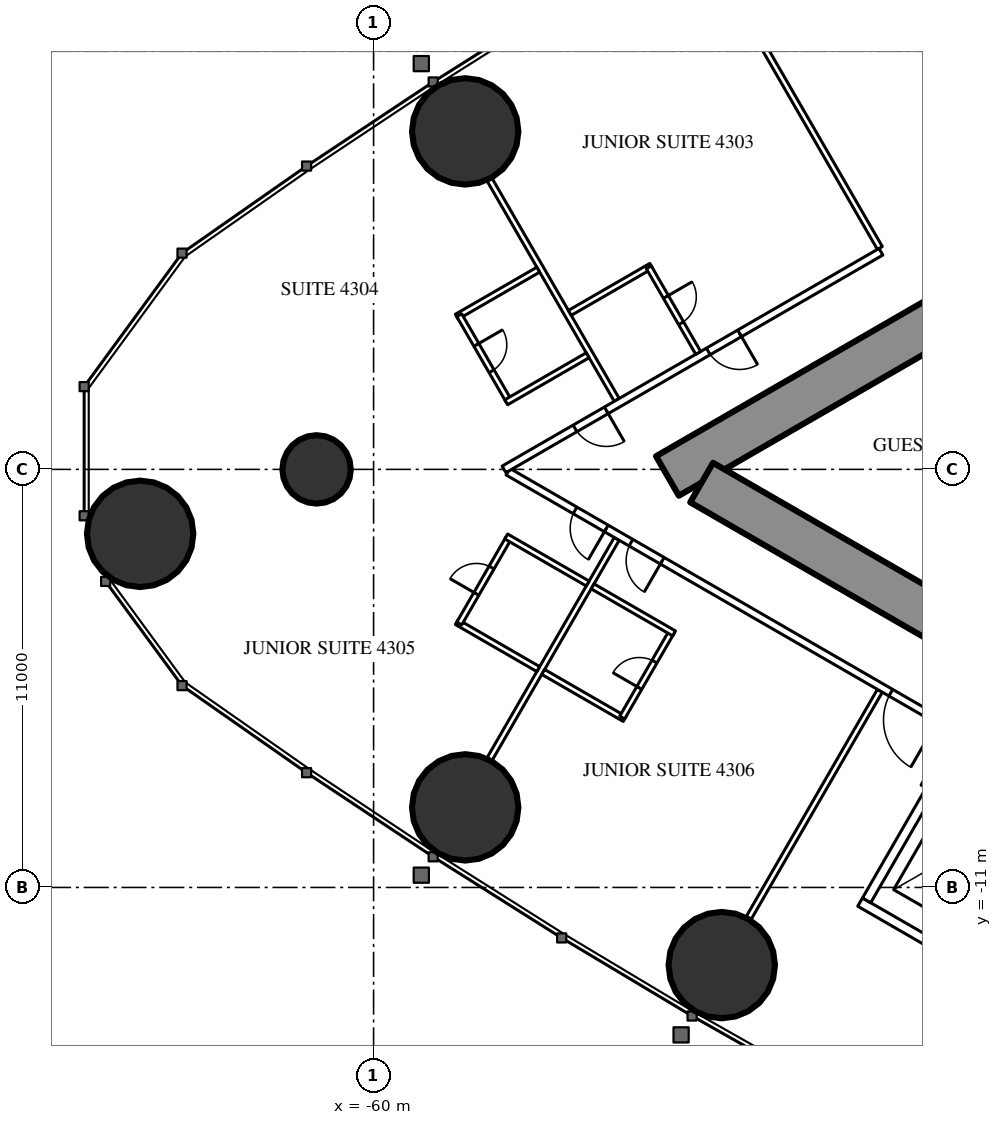
"""IFC4 building model, lengths in metres.
Left out: names, types, materials, properties, quantities, classifications, styles, units other than length and angle.
Written with IfcOpenShell. Run it as: python <this file> out.ifc"""

import sys

from ifc_helpers import new_model, si_unit, direction, frame, frame_2d, origin, origin_2d, place, context, subcontext, project, spatial, rectangle, circle, extrude, element, fill, save


model = new_model("IFC4")
c1 = context("Model", 3, precision=1e-05, world=origin(), true_north=direction((0.0, 1.0)))
c2 = subcontext(c1, "Body", "Model", "MODEL_VIEW")
j1 = project(units=[si_unit("LENGTHUNIT", "METRE"), si_unit("PLANEANGLEUNIT", "RADIAN")], contexts=[c1])
p1 = place(None, origin())
s1 = spatial("IfcSite", under=j1, at=p1, CompositionType="ELEMENT")
p2 = place(p1, origin())
s2 = spatial("IfcBuilding", under=s1, at=p2, CompositionType="ELEMENT")
p3 = place(p2, frame((0.0, 0.0, 163.3)))
s3 = spatial("IfcBuildingStorey", under=s2, at=p3, CompositionType="ELEMENT", Elevation=163.3)
for number, where, z_axis, x_axis in (
    (1, (-66.143, -1.695, 0.0), (0.0, 0.0, 1.0), (1.0, 0.0, 0.0)),
    (2, (-57.59, -8.893, 0.0), (0.0, 0.0, 1.0), (1.0, 0.0, 0.0)),
    (3, (-50.839, -13.043, 0.0), (0.0, 0.0, 1.0), (1.0, 0.0, 0.0)),
    (4, (-57.59, 8.893, 0.0), (0.0, 0.0, 1.0), (1.0, 0.0, 0.0)),
):
    element("IfcColumn", number, at=place(p3, frame(where, z_axis=z_axis, x_axis=x_axis)), inside=s3, PredefinedType="COLUMN", context=c2, shape_type="SweptSolid", body=[
        extrude(circle(Radius=1.4, at=origin_2d()), origin(), (0.0, 0.0, 1.0), 3.5),
    ])
p4 = place(p3, frame((-61.5, 0.0, 0.0), z_axis=(0.0, 0.0, 1.0), x_axis=(1.0, 0.0, 0.0)))
e5 = element("IfcColumn", 5, at=p4, inside=s3, PredefinedType="COLUMN", context=c2, shape_type="SweptSolid", body=[
    extrude(circle(Radius=0.9, at=origin_2d()), origin(), (0.0, 0.0, 1.0), 3.5),
])
p5 = place(p3, frame((-27.2, 14.3, 0.0), z_axis=(0.0, 0.0, 1.0), x_axis=(-0.866026593062, -0.499997940104, 0.0)))
e6 = element("IfcWall", 6, at=p5, inside=s3, PredefinedType="SHEAR", context=c2, shape_type="SweptSolid", body=[
    extrude(rectangle(XDim=28.946, YDim=1.2, at=frame_2d((14.473, 0.0))), origin(), (0.0, 0.0, 1.0), 3.5),
])
p6 = place(p5, frame((4.6, 0.0, 0.0)))
e7 = element("IfcOpeningElement", 7, at=p6, cuts=e6, PredefinedType="OPENING", context=c2, shape_type="SweptSolid", body=[
    extrude(rectangle(XDim=1.0, YDim=2.2, at=frame_2d((0.5, 1.1))), frame((0.0, 0.61, 0.0), z_axis=(0.0, -1.0, 0.0), x_axis=(1.0, 0.0, 0.0)), (0.0, 0.0, 1.0), 1.22),
])
p7 = place(p5, frame((13.395, 0.0, 0.0)))
e8 = element("IfcOpeningElement", 8, at=p7, cuts=e6, PredefinedType="OPENING", context=c2, shape_type="SweptSolid", body=[
    extrude(rectangle(XDim=1.8, YDim=2.2, at=frame_2d((0.9, 1.1))), frame((0.0, 0.61, 0.0), z_axis=(0.0, -1.0, 0.0), x_axis=(1.0, 0.0, 0.0)), (0.0, 0.0, 1.0), 1.22),
])
p8 = place(p3, frame((-27.2, -14.3, 0.0), z_axis=(0.0, 0.0, 1.0), x_axis=(-0.866024021859, 0.500002393557, 0.0)))
e9 = element("IfcWall", 9, at=p8, inside=s3, PredefinedType="SHEAR", context=c2, shape_type="SweptSolid", body=[
    extrude(rectangle(XDim=27.907, YDim=1.2, at=frame_2d((13.954, 0.0))), origin(), (0.0, 0.0, 1.0), 3.5),
])
p9 = place(p8, frame((4.6, 0.0, 0.0)))
e10 = element("IfcOpeningElement", 10, at=p9, cuts=e9, PredefinedType="OPENING", context=c2, shape_type="SweptSolid", body=[
    extrude(rectangle(XDim=1.0, YDim=2.2, at=frame_2d((0.5, 1.1))), frame((0.0, 0.61, 0.0), z_axis=(0.0, -1.0, 0.0), x_axis=(1.0, 0.0, 0.0)), (0.0, 0.0, 1.0), 1.22),
])
p10 = place(p8, frame((13.395, 0.0, 0.0)))
e11 = element("IfcOpeningElement", 11, at=p10, cuts=e9, PredefinedType="OPENING", context=c2, shape_type="SweptSolid", body=[
    extrude(rectangle(XDim=1.8, YDim=2.2, at=frame_2d((0.9, 1.1))), frame((0.0, 0.61, 0.0), z_axis=(0.0, -1.0, 0.0), x_axis=(1.0, 0.0, 0.0)), (0.0, 0.0, 1.0), 1.22),
])
p11 = place(p3, frame((-46.679, 5.825, 0.0), z_axis=(0.0, 0.0, 1.0), x_axis=(-0.500006839597, 0.866021454905, 0.0)))
e12 = element("IfcWall", 12, at=p11, inside=s3, PredefinedType="PARTITIONING", context=c2, shape_type="SweptSolid", body=[
    extrude(rectangle(XDim=6.911, YDim=0.15, at=frame_2d((3.456, 0.0))), origin(), (0.0, 0.0, 1.0), 2.3),
])
p12 = place(p3, frame((-53.602, 1.828, 0.0), z_axis=(0.0, 0.0, 1.0), x_axis=(-0.49999191814, 0.866030069798, 0.0)))
e13 = element("IfcWall", 13, at=p12, inside=s3, PredefinedType="PARTITIONING", context=c2, shape_type="SweptSolid", body=[
    extrude(rectangle(XDim=6.692, YDim=0.15, at=frame_2d((3.346, 0.0))), origin(), (0.0, 0.0, 1.0), 2.3),
])
p13 = place(p3, frame((-46.679, -5.825, 0.0), z_axis=(0.0, 0.0, 1.0), x_axis=(-0.500006839597, -0.866021454905, 0.0)))
e14 = element("IfcWall", 14, at=p13, inside=s3, PredefinedType="PARTITIONING", context=c2, shape_type="SweptSolid", body=[
    extrude(rectangle(XDim=6.911, YDim=0.15, at=frame_2d((3.456, 0.0))), origin(), (0.0, 0.0, 1.0), 2.3),
])
p14 = place(p3, frame((-53.602, -1.828, 0.0), z_axis=(0.0, 0.0, 1.0), x_axis=(-0.49999191814, -0.866030069798, 0.0)))
e15 = element("IfcWall", 15, at=p14, inside=s3, PredefinedType="PARTITIONING", context=c2, shape_type="SweptSolid", body=[
    extrude(rectangle(XDim=6.692, YDim=0.15, at=frame_2d((3.346, 0.0))), origin(), (0.0, 0.0, 1.0), 2.3),
])
p15 = place(p3, frame((-44.715, -6.844, 0.0), z_axis=(0.0, 0.0, 1.0), x_axis=(-0.866025261224, 0.500000246922, 0.0)))
e16 = element("IfcWall", 16, at=p15, inside=s3, PredefinedType="PARTITIONING", context=c2, shape_type="SweptSolid", body=[
    extrude(rectangle(XDim=13.567, YDim=0.2, at=frame_2d((6.783, 0.0))), origin(), (0.0, 0.0, 1.0), 3.25),
])
p16 = place(p15, frame((10.579, 0.0, 0.0)))
e17 = element("IfcOpeningElement", 17, at=p16, cuts=e16, PredefinedType="OPENING", context=c2, shape_type="SweptSolid", body=[
    extrude(rectangle(XDim=0.95, YDim=2.2, at=frame_2d((0.475, 1.1))), frame((0.0, 0.11, 0.0), z_axis=(0.0, -1.0, 0.0), x_axis=(1.0, 0.0, 0.0)), (0.0, 0.0, 1.0), 0.22),
])
p17 = place(p15, frame((8.879, 0.0, 0.0)))
e18 = element("IfcOpeningElement", 18, at=p17, cuts=e16, PredefinedType="OPENING", context=c2, shape_type="SweptSolid", body=[
    extrude(rectangle(XDim=0.95, YDim=2.2, at=frame_2d((0.475, 1.1))), frame((0.0, 0.11, 0.0), z_axis=(0.0, -1.0, 0.0), x_axis=(1.0, 0.0, 0.0)), (0.0, 0.0, 1.0), 0.22),
])
p18 = place(p15, frame((0.5, 0.0, 0.0)))
e19 = element("IfcOpeningElement", 19, at=p18, cuts=e16, PredefinedType="OPENING", context=c2, shape_type="SweptSolid", body=[
    extrude(rectangle(XDim=1.435, YDim=2.2, at=frame_2d((0.718, 1.1))), frame((0.0, 0.11, 0.0), z_axis=(0.0, -1.0, 0.0), x_axis=(1.0, 0.0, 0.0)), (0.0, 0.0, 1.0), 0.22),
])
p19 = place(p3, frame((-44.652, -6.764, 0.0), z_axis=(0.0, 0.0, 1.0), x_axis=(-0.485424724123, -0.874278466629, 0.0)))
e20 = element("IfcWall", 20, at=p19, inside=s3, PredefinedType="PARTITIONING", context=c2, shape_type="SweptSolid", body=[
    extrude(rectangle(XDim=1.805, YDim=0.15, at=frame_2d((0.903, 0.0))), origin(), (0.0, 0.0, 1.0), 3.25),
])
p20 = place(p3, frame((-46.65, 5.726, 0.0), z_axis=(0.0, 0.0, 1.0), x_axis=(-0.866027963864, -0.499995565786, 0.0)))
e21 = element("IfcWall", 21, at=p20, inside=s3, PredefinedType="PARTITIONING", context=c2, shape_type="SweptSolid", body=[
    extrude(rectangle(XDim=11.452, YDim=0.2, at=frame_2d((5.726, 0.0))), origin(), (0.0, 0.0, 1.0), 3.25),
])
p21 = place(p20, frame((4.294, 0.0, 0.0)))
e22 = element("IfcOpeningElement", 22, at=p21, cuts=e21, PredefinedType="OPENING", context=c2, shape_type="SweptSolid", body=[
    extrude(rectangle(XDim=0.95, YDim=2.2, at=frame_2d((0.475, 1.1))), frame((0.0, 0.11, 0.0), z_axis=(0.0, -1.0, 0.0), x_axis=(1.0, 0.0, 0.0)), (0.0, 0.0, 1.0), 0.22),
])
p22 = place(p20, frame((8.344, 0.0, 0.0)))
e23 = element("IfcOpeningElement", 23, at=p22, cuts=e21, PredefinedType="OPENING", context=c2, shape_type="SweptSolid", body=[
    extrude(rectangle(XDim=0.95, YDim=2.2, at=frame_2d((0.475, 1.1))), frame((0.0, 0.11, 0.0), z_axis=(0.0, -1.0, 0.0), x_axis=(1.0, 0.0, 0.0)), (0.0, 0.0, 1.0), 0.22),
])
p23 = place(p3, frame((-52.694, 5.355, 0.0), z_axis=(0.0, 0.0, 1.0), x_axis=(-0.866031185235, -0.4999899861, 0.0)))
e24 = element("IfcWall", 24, at=p23, inside=s3, PredefinedType="PARTITIONING", context=c2, shape_type="SweptSolid", body=[
    extrude(rectangle(XDim=2.475, YDim=0.15, at=frame_2d((1.238, 0.0))), origin(), (0.0, 0.0, 1.0), 3.25),
])
p24 = place(p3, frame((-51.459, 3.065, 0.0), z_axis=(0.0, 0.0, 1.0), x_axis=(-0.499936506574, 0.866062058628, 0.0)))
e25 = element("IfcWall", 25, at=p24, inside=s3, PredefinedType="PARTITIONING", context=c2, shape_type="SweptSolid", body=[
    extrude(rectangle(XDim=2.6, YDim=0.15, at=frame_2d((1.3, 0.0))), origin(), (0.0, 0.0, 1.0), 3.25),
])
p25 = place(p24, frame((0.9, 0.0, 0.0)))
e26 = element("IfcOpeningElement", 26, at=p25, cuts=e25, PredefinedType="OPENING", context=c2, shape_type="SweptSolid", body=[
    extrude(rectangle(XDim=0.8, YDim=2.2, at=frame_2d((0.4, 1.1))), frame((0.0, 0.085, 0.0), z_axis=(0.0, -1.0, 0.0), x_axis=(1.0, 0.0, 0.0)), (0.0, 0.0, 1.0), 0.17),
])
p26 = place(p3, frame((-55.667, 5.255, 0.0), z_axis=(0.0, 0.0, 1.0), x_axis=(-0.866006523861, -0.500032699561, 0.0)))
e27 = element("IfcWall", 27, at=p26, inside=s3, PredefinedType="PARTITIONING", context=c2, shape_type="SweptSolid", body=[
    extrude(rectangle(XDim=2.475, YDim=0.15, at=frame_2d((1.237, 0.0))), origin(), (0.0, 0.0, 1.0), 3.25),
])
p27 = place(p3, frame((-56.446, 1.803, 0.0), z_axis=(0.0, 0.0, 1.0), x_axis=(-0.499936506574, 0.866062058628, 0.0)))
e28 = element("IfcWall", 28, at=p27, inside=s3, PredefinedType="PARTITIONING", context=c2, shape_type="SweptSolid", body=[
    extrude(rectangle(XDim=2.6, YDim=0.15, at=frame_2d((1.3, 0.0))), origin(), (0.0, 0.0, 1.0), 3.25),
])
p28 = place(p27, frame((0.9, 0.0, 0.0)))
e29 = element("IfcOpeningElement", 29, at=p28, cuts=e28, PredefinedType="OPENING", context=c2, shape_type="SweptSolid", body=[
    extrude(rectangle(XDim=0.8, YDim=2.2, at=frame_2d((0.4, 1.1))), frame((0.0, 0.085, 0.0), z_axis=(0.0, -1.0, 0.0), x_axis=(1.0, 0.0, 0.0)), (0.0, 0.0, 1.0), 0.17),
])
p29 = place(p3, frame((-54.367, 3.003, 0.0), z_axis=(0.0, 0.0, 1.0), x_axis=(-0.866031185235, -0.4999899861, 0.0)))
e30 = element("IfcWall", 30, at=p29, inside=s3, PredefinedType="PARTITIONING", context=c2, shape_type="SweptSolid", body=[
    extrude(rectangle(XDim=2.475, YDim=0.15, at=frame_2d((1.238, 0.0))), origin(), (0.0, 0.0, 1.0), 3.25),
])
p30 = place(p3, frame((-55.667, -5.255, 0.0), z_axis=(0.0, 0.0, 1.0), x_axis=(-0.866006523861, 0.500032699561, 0.0)))
e31 = element("IfcWall", 31, at=p30, inside=s3, PredefinedType="PARTITIONING", context=c2, shape_type="SweptSolid", body=[
    extrude(rectangle(XDim=2.475, YDim=0.15, at=frame_2d((1.237, 0.0))), origin(), (0.0, 0.0, 1.0), 3.25),
])
p31 = place(p3, frame((-56.446, -1.803, 0.0), z_axis=(0.0, 0.0, 1.0), x_axis=(-0.499936506574, -0.866062058628, 0.0)))
e32 = element("IfcWall", 32, at=p31, inside=s3, PredefinedType="PARTITIONING", context=c2, shape_type="SweptSolid", body=[
    extrude(rectangle(XDim=2.6, YDim=0.15, at=frame_2d((1.3, 0.0))), origin(), (0.0, 0.0, 1.0), 3.25),
])
p32 = place(p31, frame((0.9, 0.0, 0.0)))
e33 = element("IfcOpeningElement", 33, at=p32, cuts=e32, PredefinedType="OPENING", context=c2, shape_type="SweptSolid", body=[
    extrude(rectangle(XDim=0.8, YDim=2.2, at=frame_2d((0.4, 1.1))), frame((0.0, 0.085, 0.0), z_axis=(0.0, -1.0, 0.0), x_axis=(1.0, 0.0, 0.0)), (0.0, 0.0, 1.0), 0.17),
])
for number, where, z_axis, x_axis in (
    (34, (-54.367, -3.003, 0.0), (0.0, 0.0, 1.0), (-0.866, 0.5, 0.0)),
    (35, (-53.394, -6.567, 0.0), (0.0, 0.0, 1.0), (-0.866, 0.5, 0.0)),
):
    element("IfcWall", number, at=place(p3, frame(where, z_axis=z_axis, x_axis=x_axis)), inside=s3, PredefinedType="PARTITIONING", context=c2, shape_type="SweptSolid", body=[
        extrude(rectangle(XDim=2.475, YDim=0.15, at=frame_2d((1.238, 0.0))), origin(), (0.0, 0.0, 1.0), 3.25),
    ])
p33 = place(p3, frame((-52.159, -4.278, 0.0), z_axis=(0.0, 0.0, 1.0), x_axis=(-0.500047596559, -0.865997922154, 0.0)))
e36 = element("IfcWall", 36, at=p33, inside=s3, PredefinedType="PARTITIONING", context=c2, shape_type="SweptSolid", body=[
    extrude(rectangle(XDim=2.6, YDim=0.15, at=frame_2d((1.3, 0.0))), origin(), (0.0, 0.0, 1.0), 3.25),
])
p34 = place(p33, frame((0.9, 0.0, 0.0)))
e37 = element("IfcOpeningElement", 37, at=p34, cuts=e36, PredefinedType="OPENING", context=c2, shape_type="SweptSolid", body=[
    extrude(rectangle(XDim=0.8, YDim=2.2, at=frame_2d((0.4, 1.1))), frame((0.0, 0.085, 0.0), z_axis=(0.0, -1.0, 0.0), x_axis=(1.0, 0.0, 0.0)), (0.0, 0.0, 1.0), 0.17),
])
p35 = place(p3, frame((-52.094, -4.315, 0.0), z_axis=(0.0, 0.0, 1.0), x_axis=(-0.866006523861, 0.500032699561, 0.0)))
e38 = element("IfcWall", 38, at=p35, inside=s3, PredefinedType="PARTITIONING", context=c2, shape_type="SweptSolid", body=[
    extrude(rectangle(XDim=2.475, YDim=0.15, at=frame_2d((1.237, 0.0))), origin(), (0.0, 0.0, 1.0), 2.45),
])
p36 = place(p3, frame((-41.482, -14.686, 0.0), z_axis=(0.0, 0.0, 1.0), x_axis=(-0.86603344179, 0.499986077507, 0.0)))
e39 = element("IfcWall", 39, at=p36, inside=s3, PredefinedType="PARTITIONING", context=c2, shape_type="SweptSolid", body=[
    extrude(rectangle(XDim=6.6, YDim=0.25, at=frame_2d((3.3, 0.0))), origin(), (0.0, 0.0, 1.0), 3.25),
])
p37 = place(p3, frame((-45.428, -8.568, 0.0), z_axis=(0.0, 0.0, 1.0), x_axis=(-0.499929347863, -0.866066190972, 0.0)))
e40 = element("IfcWall", 40, at=p37, inside=s3, PredefinedType="PARTITIONING", context=c2, shape_type="SweptSolid", body=[
    extrude(rectangle(XDim=3.201, YDim=0.25, at=frame_2d((1.6, 0.0))), origin(), (0.0, 0.0, 1.0), 3.25),
])
p38 = place(p25, origin())
e41 = element("IfcDoor", 41, at=p38, inside=s3, OperationType="SINGLE_SWING_RIGHT", PredefinedType="DOOR", context=c2, shape_type="SweptSolid", body=[
    extrude(rectangle(XDim=0.8, YDim=2.2, at=frame_2d((0.4, 1.1))), frame((0.0, 0.025, 0.0), z_axis=(0.0, -1.0, 0.0), x_axis=(1.0, 0.0, 0.0)), (0.0, 0.0, 1.0), 0.05),
])
fill(e26, e41)
p39 = place(p21, origin())
e42 = element("IfcDoor", 42, at=p39, inside=s3, OperationType="SINGLE_SWING_LEFT", PredefinedType="DOOR", context=c2, shape_type="SweptSolid", body=[
    extrude(rectangle(XDim=0.95, YDim=2.2, at=frame_2d((0.475, 1.1))), frame((0.0, 0.025, 0.0), z_axis=(0.0, -1.0, 0.0), x_axis=(1.0, 0.0, 0.0)), (0.0, 0.0, 1.0), 0.05),
])
fill(e22, e42)
p40 = place(p28, origin())
e43 = element("IfcDoor", 43, at=p40, inside=s3, OperationType="SINGLE_SWING_RIGHT", PredefinedType="DOOR", context=c2, shape_type="SweptSolid", body=[
    extrude(rectangle(XDim=0.8, YDim=2.2, at=frame_2d((0.4, 1.1))), frame((0.0, 0.025, 0.0), z_axis=(0.0, -1.0, 0.0), x_axis=(1.0, 0.0, 0.0)), (0.0, 0.0, 1.0), 0.05),
])
fill(e29, e43)
p41 = place(p22, origin())
e44 = element("IfcDoor", 44, at=p41, inside=s3, OperationType="SINGLE_SWING_LEFT", PredefinedType="DOOR", context=c2, shape_type="SweptSolid", body=[
    extrude(rectangle(XDim=0.95, YDim=2.2, at=frame_2d((0.475, 1.1))), frame((0.0, 0.025, 0.0), z_axis=(0.0, -1.0, 0.0), x_axis=(1.0, 0.0, 0.0)), (0.0, 0.0, 1.0), 0.05),
])
fill(e23, e44)
p42 = place(p32, origin())
e45 = element("IfcDoor", 45, at=p42, inside=s3, OperationType="SINGLE_SWING_RIGHT", PredefinedType="DOOR", context=c2, shape_type="SweptSolid", body=[
    extrude(rectangle(XDim=0.8, YDim=2.2, at=frame_2d((0.4, 1.1))), frame((0.0, 0.025, 0.0), z_axis=(0.0, -1.0, 0.0), x_axis=(1.0, 0.0, 0.0)), (0.0, 0.0, 1.0), 0.05),
])
fill(e33, e45)
p43 = place(p16, origin())
e46 = element("IfcDoor", 46, at=p43, inside=s3, OperationType="SINGLE_SWING_LEFT", PredefinedType="DOOR", context=c2, shape_type="SweptSolid", body=[
    extrude(rectangle(XDim=0.95, YDim=2.2, at=frame_2d((0.475, 1.1))), frame((0.0, 0.025, 0.0), z_axis=(0.0, -1.0, 0.0), x_axis=(1.0, 0.0, 0.0)), (0.0, 0.0, 1.0), 0.05),
])
fill(e17, e46)
p44 = place(p34, origin())
e47 = element("IfcDoor", 47, at=p44, inside=s3, OperationType="SINGLE_SWING_RIGHT", PredefinedType="DOOR", context=c2, shape_type="SweptSolid", body=[
    extrude(rectangle(XDim=0.8, YDim=2.2, at=frame_2d((0.4, 1.1))), frame((0.0, 0.025, 0.0), z_axis=(0.0, -1.0, 0.0), x_axis=(1.0, 0.0, 0.0)), (0.0, 0.0, 1.0), 0.05),
])
fill(e37, e47)
p45 = place(p17, origin())
e48 = element("IfcDoor", 48, at=p45, inside=s3, OperationType="SINGLE_SWING_LEFT", PredefinedType="DOOR", context=c2, shape_type="SweptSolid", body=[
    extrude(rectangle(XDim=0.95, YDim=2.2, at=frame_2d((0.475, 1.1))), frame((0.0, 0.025, 0.0), z_axis=(0.0, -1.0, 0.0), x_axis=(1.0, 0.0, 0.0)), (0.0, 0.0, 1.0), 0.05),
])
fill(e18, e48)
p46 = place(p18, origin())
e49 = element("IfcDoor", 49, at=p46, inside=s3, OperationType="SINGLE_SWING_LEFT", PredefinedType="DOOR", context=c2, shape_type="SweptSolid", body=[
    extrude(rectangle(XDim=1.435, YDim=2.2, at=frame_2d((0.718, 1.1))), frame((0.0, 0.025, 0.0), z_axis=(0.0, -1.0, 0.0), x_axis=(1.0, 0.0, 0.0)), (0.0, 0.0, 1.0), 0.05),
])
fill(e19, e49)
save(model, sys.argv[1])
